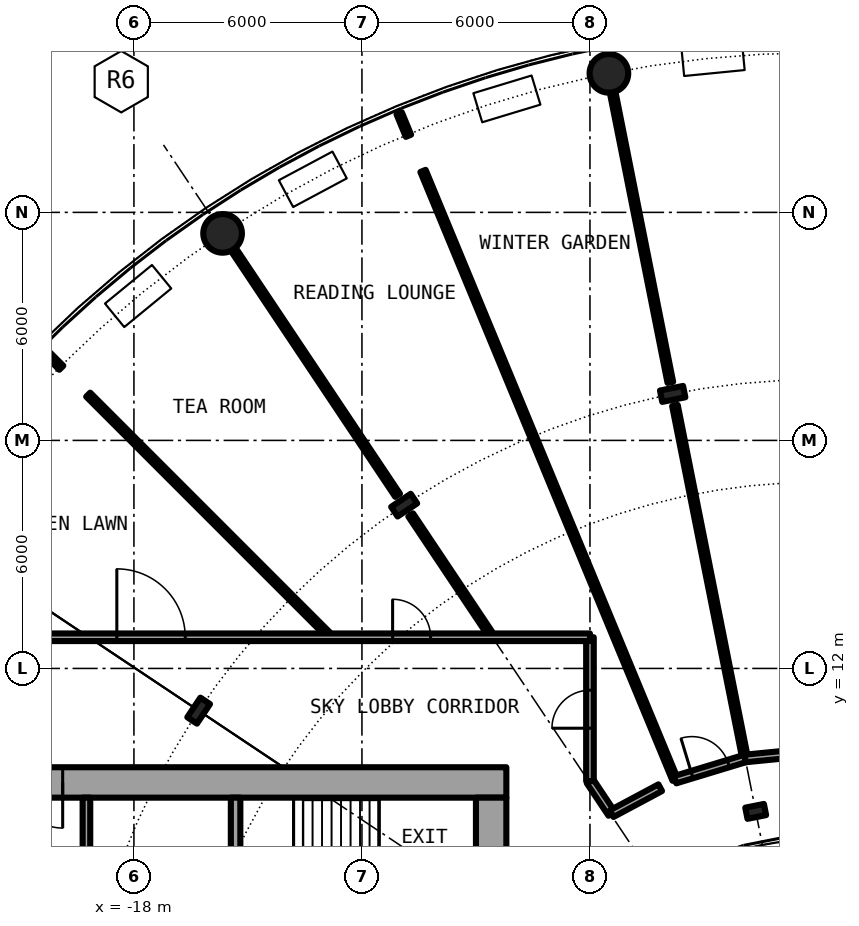
"""IFC4 building model, lengths in metres.
Left out: names, types, materials, properties, quantities, classifications, styles, units other than length and angle.
Written with IfcOpenShell. Run it as: python <this file> out.ifc"""

import sys

from ifc_helpers import new_model, si_unit, direction, frame, frame_2d, origin, origin_2d, place, context, subcontext, project, spatial, rectangle, hollow_circle, i_section, extrude, element, fill, save


model = new_model("IFC4")
c1 = context("Model", 3, precision=1e-05, world=origin(), true_north=direction((0.0, 1.0)))
c2 = subcontext(c1, "Body", "Model", "MODEL_VIEW")
j1 = project(units=[si_unit("LENGTHUNIT", "METRE"), si_unit("PLANEANGLEUNIT", "RADIAN")], contexts=[c1])
p1 = place(None, origin())
s1 = spatial("IfcSite", under=j1, at=p1, CompositionType="ELEMENT")
p2 = place(p1, origin())
s2 = spatial("IfcBuilding", under=s1, at=p2, CompositionType="ELEMENT")
p3 = place(p2, frame((0.0, 0.0, 57.5)))
s3 = spatial("IfcBuildingStorey", under=s2, at=p3, CompositionType="ELEMENT", Elevation=57.5)
for number, where, z_axis, x_axis in (
    (1, (-5.501, 27.658, 0.0), (0.0, 0.0, 1.0), (1.0, 0.0, 0.0)),
    (2, (-15.667, 23.448, 0.0), (0.0, 0.0, 1.0), (1.0, 0.0, 0.0)),
):
    element("IfcColumn", number, at=place(p3, frame(where, z_axis=z_axis, x_axis=x_axis)), inside=s3, PredefinedType="COLUMN", context=c2, shape_type="SweptSolid", body=[
        extrude(hollow_circle(Radius=0.508, WallThickness=0.05, at=origin_2d()), origin(), (0.0, 0.0, 1.0), 6.1),
    ])
for number, where, z_axis, x_axis in (
    (3, (-3.824, 19.223, 0.0), (0.0, 0.0, 1.0), (-0.195, 0.981, 0.0)),
    (4, (-10.889, 16.297, 0.0), (0.0, 0.0, 1.0), (-0.556, 0.831, 0.0)),
    (5, (-16.297, 10.889, 0.0), (0.0, 0.0, 1.0), (-0.831, 0.556, 0.0)),
):
    element("IfcColumn", number, at=place(p3, frame(where, z_axis=z_axis, x_axis=x_axis)), inside=s3, PredefinedType="COLUMN", context=c2, shape_type="SweptSolid", body=[
        extrude(i_section(OverallWidth=0.305, OverallDepth=0.62, WebThickness=0.021, FlangeThickness=0.04, FilletRadius=0.027, at=origin_2d()), origin(), (0.0, 0.0, 1.0), 6.1),
    ])
p4 = place(p3, frame((-1.639, 8.239, 0.0), z_axis=(0.0, 0.0, 1.0), x_axis=(-0.195090322016, 0.980785280403, 0.0)))
e6 = element("IfcColumn", 6, at=p4, inside=s3, PredefinedType="COLUMN", context=c2, shape_type="SweptSolid", body=[
    extrude(i_section(OverallWidth=0.3, OverallDepth=0.5, WebThickness=0.014, FlangeThickness=0.028, FilletRadius=0.027, at=origin_2d()), origin(), (0.0, 0.0, 1.0), 6.1),
])
p5 = place(p3, frame((-8.2, 9.0, 0.0), z_axis=(0.0, 0.0, 1.0), x_axis=(-1.0, 0.0, 0.0)))
e7 = element("IfcWall", 7, at=p5, inside=s3, PredefinedType="SHEAR", context=c2, shape_type="SweptSolid", body=[
    extrude(rectangle(XDim=14.2, YDim=0.8, at=frame_2d((7.1, 0.0))), origin(), (0.0, 0.0, 1.0), 6.1),
])
p6 = place(p5, frame((11.675, 0.0, 0.0)))
e8 = element("IfcOpeningElement", 8, at=p6, cuts=e7, PredefinedType="OPENING", context=c2, shape_type="SweptSolid", body=[
    extrude(rectangle(XDim=1.2, YDim=2.3, at=frame_2d((0.6, 1.15))), frame((0.0, 0.41, 0.0), z_axis=(0.0, -1.0, 0.0), x_axis=(1.0, 0.0, 0.0)), (0.0, 0.0, 1.0), 0.82),
])
p7 = place(p3, frame((-8.6, 8.6, 0.0), z_axis=(0.0, 0.0, 1.0), x_axis=(0.0, -1.0, 0.0)))
e9 = element("IfcWall", 9, at=p7, inside=s3, PredefinedType="SHEAR", context=c2, shape_type="SweptSolid", body=[
    extrude(rectangle(XDim=17.2, YDim=0.8, at=frame_2d((8.6, 0.0))), origin(), (0.0, 0.0, 1.0), 6.1),
])
p8 = place(p7, frame((7.4, 0.0, 0.1)))
e10 = element("IfcOpeningElement", 10, at=p8, cuts=e9, PredefinedType="OPENING", context=c2, shape_type="SweptSolid", body=[
    extrude(rectangle(XDim=2.4, YDim=2.2, at=frame_2d((1.2, 1.1))), frame((0.0, 0.41, 0.0), z_axis=(0.0, -1.0, 0.0), x_axis=(1.0, 0.0, 0.0)), (0.0, 0.0, 1.0), 0.82),
])
p9 = place(p3, frame((-15.325, 8.6, 0.0), z_axis=(0.0, 0.0, 1.0), x_axis=(0.0, -1.0, 0.0)))
e11 = element("IfcWall", 11, at=p9, inside=s3, PredefinedType="SHEAR", context=c2, shape_type="SweptSolid", body=[
    extrude(rectangle(XDim=3.95, YDim=0.25, at=frame_2d((1.975, 0.0))), origin(), (0.0, 0.0, 1.0), 6.1),
])
p10 = place(p9, frame((2.025, 0.0, 0.0)))
e12 = element("IfcOpeningElement", 12, at=p10, cuts=e11, PredefinedType="OPENING", context=c2, shape_type="SweptSolid", body=[
    extrude(rectangle(XDim=1.2, YDim=2.3, at=frame_2d((0.6, 1.15))), frame((0.0, 0.135, 0.0), z_axis=(0.0, -1.0, 0.0), x_axis=(1.0, 0.0, 0.0)), (0.0, 0.0, 1.0), 0.27),
])
p11 = place(p3, frame((-19.25, 8.6, 0.0), z_axis=(0.0, 0.0, 1.0), x_axis=(0.0, -1.0, 0.0)))
e13 = element("IfcWall", 13, at=p11, inside=s3, PredefinedType="SOLIDWALL", context=c2, shape_type="SweptSolid", body=[
    extrude(rectangle(XDim=7.025, YDim=0.2, at=frame_2d((3.513, 0.0))), origin(), (0.0, 0.0, 1.0), 5.75),
])
p12 = place(p11, frame((2.35, 0.0, 0.0)))
e14 = element("IfcOpeningElement", 14, at=p12, cuts=e13, PredefinedType="OPENING", context=c2, shape_type="SweptSolid", body=[
    extrude(rectangle(XDim=1.1, YDim=2.3, at=frame_2d((0.55, 1.15))), frame((0.0, 0.11, 0.0), z_axis=(0.0, -1.0, 0.0), x_axis=(1.0, 0.0, 0.0)), (0.0, 0.0, 1.0), 0.22),
])
p13 = place(p3, frame((-20.365, 20.365, 0.0), z_axis=(0.0, 0.0, 1.0), x_axis=(0.707106781187, -0.707106781187, 0.0)))
e15 = element("IfcWall", 15, at=p13, inside=s3, PredefinedType="PARTITIONING", context=c2, shape_type="SweptSolid", body=[
    extrude(rectangle(XDim=0.642, YDim=0.15, at=frame_2d((0.321, 0.0))), origin(), (0.0, 0.0, 1.0), 5.75),
])
p14 = place(p3, frame((-19.204, 19.204, 0.0), z_axis=(0.0, 0.0, 1.0), x_axis=(0.707106781187, -0.707106781187, 0.0)))
e16 = element("IfcWall", 16, at=p14, inside=s3, PredefinedType="PARTITIONING", context=c2, shape_type="SweptSolid", body=[
    extrude(rectangle(XDim=9.028, YDim=0.15, at=frame_2d((4.514, 0.0))), origin(), (0.0, 0.0, 1.0), 5.75),
])
p15 = place(p3, frame((-15.39, 23.033, 0.0), z_axis=(0.0, 0.0, 1.0), x_axis=(0.555603767829, -0.831447204081, 0.0)))
e17 = element("IfcWall", 17, at=p15, inside=s3, PredefinedType="PARTITIONING", context=c2, shape_type="SweptSolid", body=[
    extrude(rectangle(XDim=7.791, YDim=0.15, at=frame_2d((3.896, 0.0))), origin(), (0.0, 0.0, 1.0), 5.75),
])
p16 = place(p3, frame((-11.021, 26.608, 0.0), z_axis=(0.0, 0.0, 1.0), x_axis=(0.38199330966, -0.92416508881, 0.0)))
e18 = element("IfcWall", 18, at=p16, inside=s3, PredefinedType="PARTITIONING", context=c2, shape_type="SweptSolid", body=[
    extrude(rectangle(XDim=0.642, YDim=0.15, at=frame_2d((0.321, 0.0))), origin(), (0.0, 0.0, 1.0), 5.75),
])
p17 = place(p3, frame((-10.717, 16.039, 0.0), z_axis=(0.0, 0.0, 1.0), x_axis=(0.55561664662, -0.831438597853, 0.0)))
e19 = element("IfcWall", 19, at=p17, inside=s3, PredefinedType="PARTITIONING", context=c2, shape_type="SweptSolid", body=[
    extrude(rectangle(XDim=3.872, YDim=0.15, at=frame_2d((1.936, 0.0))), origin(), (0.0, 0.0, 1.0), 5.75),
])
p18 = place(p3, frame((-10.393, 25.091, 0.0), z_axis=(0.0, 0.0, 1.0), x_axis=(0.382668905709, -0.923885549516, 0.0)))
e20 = element("IfcWall", 20, at=p18, inside=s3, PredefinedType="PARTITIONING", context=c2, shape_type="SweptSolid", body=[
    extrude(rectangle(XDim=17.339, YDim=0.15, at=frame_2d((8.669, 0.0))), origin(), (0.0, 0.0, 1.0), 5.75),
])
p19 = place(p3, frame((-5.405, 27.169, 0.0), z_axis=(0.0, 0.0, 1.0), x_axis=(0.195085619607, -0.980786215759, 0.0)))
e21 = element("IfcWall", 21, at=p19, inside=s3, PredefinedType="PARTITIONING", context=c2, shape_type="SweptSolid", body=[
    extrude(rectangle(XDim=7.792, YDim=0.15, at=frame_2d((3.896, 0.0))), origin(), (0.0, 0.0, 1.0), 5.75),
])
p20 = place(p3, frame((-3.764, 18.919, 0.0), z_axis=(0.0, 0.0, 1.0), x_axis=(0.195134385789, -0.980776514545, 0.0)))
e22 = element("IfcWall", 22, at=p20, inside=s3, PredefinedType="PARTITIONING", context=c2, shape_type="SweptSolid", body=[
    extrude(rectangle(XDim=9.47, YDim=0.15, at=frame_2d((4.735, 0.0))), origin(), (0.0, 0.0, 1.0), 5.75),
])
p21 = place(p3, frame((-6.0, 9.034, 0.0), z_axis=(0.0, 0.0, 1.0), x_axis=(0.555412364489, -0.831575075007, 0.0)))
e23 = element("IfcWall", 23, at=p21, inside=s3, PredefinedType="PARTITIONING", context=c2, shape_type="SweptSolid", body=[
    extrude(rectangle(XDim=1.028, YDim=0.2, at=frame_2d((0.514, 0.0))), origin(), (0.0, 0.0, 1.0), 5.75),
])
p22 = place(p3, frame((-6.0, 9.034, 0.0), z_axis=(0.0, 0.0, 1.0), x_axis=(0.0, 1.0, 0.0)))
e24 = element("IfcWall", 24, at=p22, inside=s3, PredefinedType="PARTITIONING", context=c2, shape_type="SweptSolid", body=[
    extrude(rectangle(XDim=3.786, YDim=0.2, at=frame_2d((1.893, 0.0))), origin(), (0.0, 0.0, 1.0), 5.75),
])
p23 = place(p22, frame((1.393, 0.0, 0.0)))
e25 = element("IfcOpeningElement", 25, at=p23, cuts=e24, PredefinedType="OPENING", context=c2, shape_type="SweptSolid", body=[
    extrude(rectangle(XDim=1.0, YDim=2.3, at=frame_2d((0.5, 1.15))), frame((0.0, 0.11, 0.0), z_axis=(0.0, -1.0, 0.0), x_axis=(1.0, 0.0, 0.0)), (0.0, 0.0, 1.0), 0.22),
])
p24 = place(p3, frame((-5.429, 8.179, 0.0), z_axis=(0.0, 0.0, 1.0), x_axis=(0.88193287619, 0.471375011954, 0.0)))
e26 = element("IfcWall", 26, at=p24, inside=s3, PredefinedType="PARTITIONING", context=c2, shape_type="SweptSolid", body=[
    extrude(rectangle(XDim=1.449, YDim=0.2, at=frame_2d((0.725, 0.0))), origin(), (0.0, 0.0, 1.0), 5.75),
])
p25 = place(p3, frame((-3.758, 9.072, 0.0), z_axis=(0.0, 0.0, 1.0), x_axis=(0.956896312675, 0.29042976223, 0.0)))
e27 = element("IfcWall", 27, at=p25, inside=s3, PredefinedType="PARTITIONING", context=c2, shape_type="SweptSolid", body=[
    extrude(rectangle(XDim=1.925, YDim=0.2, at=frame_2d((0.962, 0.0))), origin(), (0.0, 0.0, 1.0), 5.75),
])
p26 = place(p25, frame((0.462, 0.0, 0.0)))
e28 = element("IfcOpeningElement", 28, at=p26, cuts=e27, PredefinedType="OPENING", context=c2, shape_type="SweptSolid", body=[
    extrude(rectangle(XDim=1.0, YDim=2.3, at=frame_2d((0.5, 1.15))), frame((0.0, 0.11, 0.0), z_axis=(0.0, -1.0, 0.0), x_axis=(1.0, 0.0, 0.0)), (0.0, 0.0, 1.0), 0.22),
])
p27 = place(p3, frame((-1.916, 9.631, 0.0), z_axis=(0.0, 0.0, 1.0), x_axis=(0.995171860647, 0.098147683504, 0.0)))
e29 = element("IfcWall", 29, at=p27, inside=s3, PredefinedType="PARTITIONING", context=c2, shape_type="SweptSolid", body=[
    extrude(rectangle(XDim=1.925, YDim=0.2, at=frame_2d((0.963, 0.0))), origin(), (0.0, 0.0, 1.0), 5.75),
])
p28 = place(p3, frame((-21.9, 12.82, 0.0), z_axis=(0.0, 0.0, 1.0), x_axis=(1.0, 0.0, 0.0)))
e30 = element("IfcWall", 30, at=p28, inside=s3, PredefinedType="PARTITIONING", context=c2, shape_type="SweptSolid", body=[
    extrude(rectangle(XDim=15.9, YDim=0.2, at=frame_2d((7.95, 0.0))), origin(), (0.0, 0.0, 1.0), 5.75),
])
p29 = place(p28, frame((10.707, 0.0, 0.0)))
e31 = element("IfcOpeningElement", 31, at=p29, cuts=e30, PredefinedType="OPENING", context=c2, shape_type="SweptSolid", body=[
    extrude(rectangle(XDim=1.0, YDim=2.3, at=frame_2d((0.5, 1.15))), frame((0.0, 0.11, 0.0), z_axis=(0.0, -1.0, 0.0), x_axis=(1.0, 0.0, 0.0)), (0.0, 0.0, 1.0), 0.22),
])
p30 = place(p28, frame((3.45, 0.0, 0.0)))
e32 = element("IfcOpeningElement", 32, at=p30, cuts=e30, PredefinedType="OPENING", context=c2, shape_type="SweptSolid", body=[
    extrude(rectangle(XDim=1.8, YDim=2.3, at=frame_2d((0.9, 1.15))), frame((0.0, 0.11, 0.0), z_axis=(0.0, -1.0, 0.0), x_axis=(1.0, 0.0, 0.0)), (0.0, 0.0, 1.0), 0.22),
])
p31 = place(p6, origin())
e33 = element("IfcDoor", 33, at=p31, inside=s3, OperationType="SINGLE_SWING_LEFT", PredefinedType="DOOR", context=c2, shape_type="SweptSolid", body=[
    extrude(rectangle(XDim=1.2, YDim=2.3, at=frame_2d((0.6, 1.15))), frame((0.0, 0.025, 0.0), z_axis=(0.0, -1.0, 0.0), x_axis=(1.0, 0.0, 0.0)), (0.0, 0.0, 1.0), 0.05),
])
fill(e8, e33)
p32 = place(p26, origin())
e34 = element("IfcDoor", 34, at=p32, inside=s3, OperationType="SINGLE_SWING_RIGHT", PredefinedType="DOOR", context=c2, shape_type="SweptSolid", body=[
    extrude(rectangle(XDim=1.0, YDim=2.3, at=frame_2d((0.5, 1.15))), frame((0.0, 0.025, 0.0), z_axis=(0.0, -1.0, 0.0), x_axis=(1.0, 0.0, 0.0)), (0.0, 0.0, 1.0), 0.05),
])
fill(e28, e34)
p33 = place(p23, origin())
e35 = element("IfcDoor", 35, at=p33, inside=s3, OperationType="SINGLE_SWING_LEFT", PredefinedType="DOOR", context=c2, shape_type="SweptSolid", body=[
    extrude(rectangle(XDim=1.0, YDim=2.3, at=frame_2d((0.5, 1.15))), frame((0.0, 0.025, 0.0), z_axis=(0.0, -1.0, 0.0), x_axis=(1.0, 0.0, 0.0)), (0.0, 0.0, 1.0), 0.05),
])
fill(e25, e35)
p34 = place(p29, origin())
e36 = element("IfcDoor", 36, at=p34, inside=s3, OperationType="SINGLE_SWING_RIGHT", PredefinedType="DOOR", context=c2, shape_type="SweptSolid", body=[
    extrude(rectangle(XDim=1.0, YDim=2.3, at=frame_2d((0.5, 1.15))), frame((0.0, 0.025, 0.0), z_axis=(0.0, -1.0, 0.0), x_axis=(1.0, 0.0, 0.0)), (0.0, 0.0, 1.0), 0.05),
])
fill(e31, e36)
p35 = place(p30, origin())
e37 = element("IfcDoor", 37, at=p35, inside=s3, OperationType="DOUBLE_DOOR_SINGLE_SWING", PredefinedType="DOOR", context=c2, shape_type="SweptSolid", body=[
    extrude(rectangle(XDim=1.8, YDim=2.3, at=frame_2d((0.9, 1.15))), frame((0.0, 0.025, 0.0), z_axis=(0.0, -1.0, 0.0), x_axis=(1.0, 0.0, 0.0)), (0.0, 0.0, 1.0), 0.05),
])
fill(e32, e37)
save(model, sys.argv[1])
